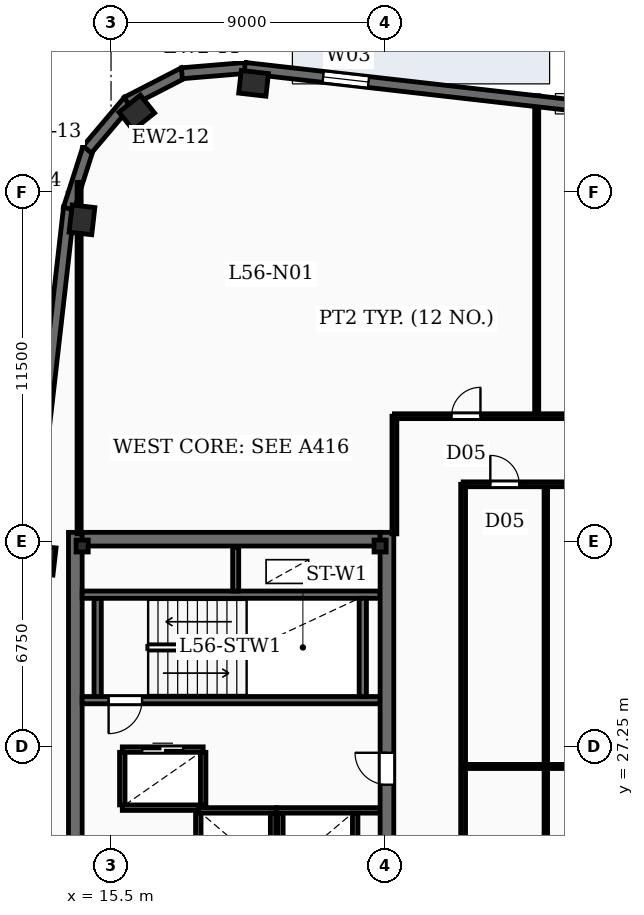
"""IFC4 building model, lengths in metres.
Left out: names, types, materials, properties, quantities, classifications, styles, units other than length and angle.
Written with IfcOpenShell. Run it as: python <this file> out.ifc"""

import sys

from ifc_helpers import new_model, si_unit, direction, frame, frame_2d, origin, origin_2d, place, context, subcontext, project, spatial, rectangle, i_section, extrude, element, fill, save


model = new_model("IFC4")
c1 = context("Model", 3, precision=1e-05, world=origin(), true_north=direction((0.0, 1.0)))
c2 = subcontext(c1, "Body", "Model", "MODEL_VIEW")
j1 = project(units=[si_unit("LENGTHUNIT", "METRE"), si_unit("PLANEANGLEUNIT", "RADIAN")], contexts=[c1])
p1 = place(None, origin())
s1 = spatial("IfcSite", under=j1, at=p1, CompositionType="ELEMENT")
p2 = place(p1, origin())
s2 = spatial("IfcBuilding", under=s1, at=p2, CompositionType="ELEMENT")
p3 = place(p2, frame((0.0, 0.0, 232.2)))
s3 = spatial("IfcBuildingStorey", under=s2, at=p3, CompositionType="ELEMENT", Elevation=232.2)
p4 = place(p3, frame((14.325, 19.0, -0.27), z_axis=(0.0, 0.0, 1.0), x_axis=(0.0, 1.0, 0.0)))
e1 = element("IfcWall", 1, at=p4, inside=s3, PredefinedType="SHEAR", context=c2, shape_type="SweptSolid", body=[
    extrude(rectangle(XDim=15.3, YDim=0.45, at=frame_2d((7.65, 0.0))), origin(), (0.0, 0.0, 1.0), 3.75),
])
p5 = place(p3, frame((24.575, 19.0, -0.27), z_axis=(0.0, 0.0, 1.0), x_axis=(0.0, 1.0, 0.0)))
e2 = element("IfcWall", 2, at=p5, inside=s3, PredefinedType="SHEAR", context=c2, shape_type="SweptSolid", body=[
    extrude(rectangle(XDim=15.3, YDim=0.45, at=frame_2d((7.65, 0.0))), origin(), (0.0, 0.0, 1.0), 3.75),
])
p6 = place(p5, frame((2.5, 0.0, 0.27)))
e3 = element("IfcOpeningElement", 3, at=p6, cuts=e2, PredefinedType="OPENING", context=c2, shape_type="SweptSolid", body=[
    extrude(rectangle(XDim=1.05, YDim=2.15, at=frame_2d((0.525, 1.075))), frame((0.0, 0.235, 0.0), z_axis=(0.0, -1.0, 0.0), x_axis=(1.0, 0.0, 0.0)), (0.0, 0.0, 1.0), 0.47),
])
p7 = place(p5, frame((7.0, 0.0, 0.27)))
e4 = element("IfcOpeningElement", 4, at=p7, cuts=e2, PredefinedType="OPENING", context=c2, shape_type="SweptSolid", body=[
    extrude(rectangle(XDim=1.05, YDim=2.15, at=frame_2d((0.525, 1.075))), frame((0.0, 0.235, 0.0), z_axis=(0.0, -1.0, 0.0), x_axis=(1.0, 0.0, 0.0)), (0.0, 0.0, 1.0), 0.47),
])
p8 = place(p3, frame((14.55, 34.075, -0.27), z_axis=(0.0, 0.0, 1.0), x_axis=(1.0, 0.0, 0.0)))
e5 = element("IfcWall", 5, at=p8, inside=s3, PredefinedType="SHEAR", context=c2, shape_type="SweptSolid", body=[
    extrude(rectangle(XDim=9.8, YDim=0.45, at=frame_2d((4.9, 0.0))), origin(), (0.0, 0.0, 1.0), 3.75),
])
for number, where, z_axis, x_axis in (
    (6, (14.55, 33.85, -0.27), (0.0, 0.0, 1.0), (1.0, 0.0, 0.0)),
    (7, (24.35, 33.85, -0.27), (0.0, 0.0, 1.0), (1.0, 0.0, 0.0)),
):
    element("IfcColumn", number, at=place(p3, frame(where, z_axis=z_axis, x_axis=x_axis)), inside=s3, PredefinedType="COLUMN", context=c2, shape_type="SweptSolid", body=[
        extrude(i_section(OverallWidth=0.399, OverallDepth=0.393, WebThickness=0.023, FlangeThickness=0.037, FilletRadius=0.02, at=origin_2d()), origin(), (0.0, 0.0, 1.0), 3.75),
    ])
for number, where, z_axis, x_axis in (
    (8, (20.189, 49.068, -0.27), (0.0, 0.0, 1.0), (0.994, -0.113, 0.0)),
    (9, (16.346, 48.105, -0.27), (0.0, 0.0, 1.0), (0.783, 0.623, 0.0)),
    (10, (14.544, 44.578, -0.27), (0.0, 0.0, 1.0), (0.113, 0.994, 0.0)),
    (11, (13.269, 33.384, -0.27), (0.0, 0.0, 1.0), (0.113, 0.994, 0.0)),
):
    element("IfcColumn", number, at=place(p3, frame(where, z_axis=z_axis, x_axis=x_axis)), inside=s3, PredefinedType="COLUMN", context=c2, shape_type="SweptSolid", body=[
        extrude(rectangle(XDim=0.9, YDim=0.75, at=origin_2d()), origin(), (0.0, 0.0, 1.0), 3.75),
    ])
p9 = place(p3, frame((19.894, 49.575, 0.0), z_axis=(0.0, 0.0, 1.0), x_axis=(0.993571439016, -0.113206870688, 0.0)))
e12 = element("IfcWall", 12, at=p9, inside=s3, PredefinedType="SOLIDWALL", context=c2, shape_type="SweptSolid", body=[
    extrude(rectangle(XDim=46.8, YDim=0.36, at=frame_2d((23.4, 0.0))), origin(), (0.0, 0.0, 1.0), 3.48),
])
p10 = place(p9, frame((2.6, 0.0, 0.88)))
e13 = element("IfcOpeningElement", 13, at=p10, cuts=e12, PredefinedType="OPENING", context=c2, shape_type="SweptSolid", body=[
    extrude(rectangle(XDim=1.5, YDim=2.05, at=frame_2d((0.75, 1.025))), frame((0.0, 0.19, 0.0), z_axis=(0.0, -1.0, 0.0), x_axis=(1.0, 0.0, 0.0)), (0.0, 0.0, 1.0), 0.38),
])
p11 = place(p9, frame((29.6, 0.0, 0.88)))
e14 = element("IfcOpeningElement", 14, at=p11, cuts=e12, PredefinedType="OPENING", context=c2, shape_type="SweptSolid", body=[
    extrude(rectangle(XDim=1.5, YDim=2.05, at=frame_2d((0.75, 1.025))), frame((0.0, 0.19, 0.0), z_axis=(0.0, -1.0, 0.0), x_axis=(1.0, 0.0, 0.0)), (0.0, 0.0, 1.0), 0.38),
])
for number, where, z_axis, x_axis in (
    (15, (17.83, 49.399, 0.0), (0.0, 0.0, 1.0), (0.997, 0.083, 0.0)),
    (16, (16.024, 48.454, 0.0), (0.0, 0.0, 1.0), (0.889, 0.458, 0.0)),
    (17, (14.718, 46.89, 0.0), (0.0, 0.0, 1.0), (0.646, 0.763, 0.0)),
):
    element("IfcWall", number, at=place(p3, frame(where, z_axis=z_axis, x_axis=x_axis)), inside=s3, PredefinedType="SOLIDWALL", context=c2, shape_type="SweptSolid", body=[
        extrude(rectangle(XDim=2.107, YDim=0.36, at=frame_2d((1.054, 0.0))), origin(), (0.0, 0.0, 1.0), 3.48),
    ])
p12 = place(p3, frame((14.109, 44.945, 0.0), z_axis=(0.0, 0.0, 1.0), x_axis=(0.304872429864, 0.952393196904, 0.0)))
e18 = element("IfcWall", 18, at=p12, inside=s3, PredefinedType="SOLIDWALL", context=c2, shape_type="SweptSolid", body=[
    extrude(rectangle(XDim=2.107, YDim=0.36, at=frame_2d((1.053, 0.0))), origin(), (0.0, 0.0, 1.0), 3.48),
])
p13 = place(p3, frame((10.211, 10.701, 0.0), z_axis=(0.0, 0.0, 1.0), x_axis=(0.113203107947, 0.993571867733, 0.0)))
e19 = element("IfcWall", 19, at=p13, inside=s3, PredefinedType="SOLIDWALL", context=c2, shape_type="SweptSolid", body=[
    extrude(rectangle(XDim=34.5, YDim=0.36, at=frame_2d((17.25, 0.0))), origin(), (0.0, 0.0, 1.0), 3.48),
])
p14 = place(p13, frame((4.2, 0.0, 0.88)))
e20 = element("IfcOpeningElement", 20, at=p14, cuts=e19, PredefinedType="OPENING", context=c2, shape_type="SweptSolid", body=[
    extrude(rectangle(XDim=1.35, YDim=2.2, at=frame_2d((0.675, 1.1))), frame((0.0, 0.19, 0.0), z_axis=(0.0, -1.0, 0.0), x_axis=(1.0, 0.0, 0.0)), (0.0, 0.0, 1.0), 0.38),
])
p15 = place(p13, frame((15.4, 0.0, 0.88)))
e21 = element("IfcOpeningElement", 21, at=p15, cuts=e19, PredefinedType="OPENING", context=c2, shape_type="SweptSolid", body=[
    extrude(rectangle(XDim=1.35, YDim=2.2, at=frame_2d((0.675, 1.1))), frame((0.0, 0.19, 0.0), z_axis=(0.0, -1.0, 0.0), x_axis=(1.0, 0.0, 0.0)), (0.0, 0.0, 1.0), 0.38),
])
p16 = place(p13, frame((26.6, 0.0, 0.88)))
e22 = element("IfcOpeningElement", 22, at=p16, cuts=e19, PredefinedType="OPENING", context=c2, shape_type="SweptSolid", body=[
    extrude(rectangle(XDim=1.35, YDim=2.2, at=frame_2d((0.675, 1.1))), frame((0.0, 0.19, 0.0), z_axis=(0.0, -1.0, 0.0), x_axis=(1.0, 0.0, 0.0)), (0.0, 0.0, 1.0), 0.38),
])
p17 = place(p3, frame((24.35, 28.78, 0.0), z_axis=(0.0, 0.0, 1.0), x_axis=(-1.0, 0.0, 0.0)))
e23 = element("IfcWall", 23, at=p17, inside=s3, PredefinedType="SOLIDWALL", context=c2, shape_type="SweptSolid", body=[
    extrude(rectangle(XDim=9.8, YDim=0.24, at=frame_2d((4.9, 0.0))), origin(), (0.0, 0.0, 1.0), 3.48),
])
p18 = place(p17, frame((7.83, 0.0, 0.0)))
e24 = element("IfcOpeningElement", 24, at=p18, cuts=e23, PredefinedType="OPENING", context=c2, shape_type="SweptSolid", body=[
    extrude(rectangle(XDim=1.1, YDim=2.15, at=frame_2d((0.55, 1.075))), frame((0.0, 0.13, 0.0), z_axis=(0.0, -1.0, 0.0), x_axis=(1.0, 0.0, 0.0)), (0.0, 0.0, 1.0), 0.26),
])
p19 = place(p3, frame((14.55, 32.25, 0.0), z_axis=(0.0, 0.0, 1.0), x_axis=(1.0, 0.0, 0.0)))
e25 = element("IfcWall", 25, at=p19, inside=s3, PredefinedType="SOLIDWALL", context=c2, shape_type="SweptSolid", body=[
    extrude(rectangle(XDim=9.8, YDim=0.24, at=frame_2d((4.9, 0.0))), origin(), (0.0, 0.0, 1.0), 3.48),
])
for number, where, z_axis, x_axis in (
    (26, (15.06, 28.9, 0.0), (0.0, 0.0, 1.0), (0.0, 1.0, 0.0)),
    (27, (23.78, 28.9, 0.0), (0.0, 0.0, 1.0), (0.0, 1.0, 0.0)),
):
    element("IfcWall", number, at=place(p3, frame(where, z_axis=z_axis, x_axis=x_axis)), inside=s3, PredefinedType="SOLIDWALL", context=c2, shape_type="SweptSolid", body=[
        extrude(rectangle(XDim=3.23, YDim=0.24, at=frame_2d((1.615, 0.0))), origin(), (0.0, 0.0, 1.0), 3.48),
    ])
p20 = place(p3, frame((19.6, 32.37, 0.0), z_axis=(0.0, 0.0, 1.0), x_axis=(0.0, 1.0, 0.0)))
e28 = element("IfcWall", 28, at=p20, inside=s3, PredefinedType="SOLIDWALL", context=c2, shape_type="SweptSolid", body=[
    extrude(rectangle(XDim=1.43, YDim=0.2, at=frame_2d((0.715, 0.0))), origin(), (0.0, 0.0, 1.0), 3.48),
])
p21 = place(p3, frame((18.37, 25.155, 0.0), z_axis=(0.0, 0.0, 1.0), x_axis=(1.0, 0.0, 0.0)))
e29 = element("IfcWall", 29, at=p21, inside=s3, PredefinedType="SOLIDWALL", context=c2, shape_type="SweptSolid", body=[
    extrude(rectangle(XDim=2.58, YDim=0.18, at=frame_2d((1.29, 0.0))), origin(), (0.0, 0.0, 1.0), 3.48),
])
for number, where, z_axis, x_axis in (
    (30, (18.37, 23.135, 0.0), (0.0, 0.0, 1.0), (0.0, 1.0, 0.0)),
    (31, (20.83, 23.135, 0.0), (0.0, 0.0, 1.0), (0.0, 1.0, 0.0)),
):
    element("IfcWall", number, at=place(p3, frame(where, z_axis=z_axis, x_axis=x_axis)), inside=s3, PredefinedType="SOLIDWALL", context=c2, shape_type="SweptSolid", body=[
        extrude(rectangle(XDim=1.93, YDim=0.18, at=frame_2d((0.965, 0.0))), origin(), (0.0, 0.0, 1.0), 3.48),
    ])
p22 = place(p3, frame((20.95, 25.155, 0.0), z_axis=(0.0, 0.0, 1.0), x_axis=(1.0, 0.0, 0.0)))
e32 = element("IfcWall", 32, at=p22, inside=s3, PredefinedType="SOLIDWALL", context=c2, shape_type="SweptSolid", body=[
    extrude(rectangle(XDim=3.4, YDim=0.18, at=frame_2d((1.7, 0.0))), origin(), (0.0, 0.0, 1.0), 3.48),
])
for number, where, z_axis, x_axis in (
    (33, (21.07, 23.135, 0.0), (0.0, 0.0, 1.0), (0.0, 1.0, 0.0)),
    (34, (23.53, 23.135, 0.0), (0.0, 0.0, 1.0), (0.0, 1.0, 0.0)),
):
    element("IfcWall", number, at=place(p3, frame(where, z_axis=z_axis, x_axis=x_axis)), inside=s3, PredefinedType="SOLIDWALL", context=c2, shape_type="SweptSolid", body=[
        extrude(rectangle(XDim=1.93, YDim=0.18, at=frame_2d((0.965, 0.0))), origin(), (0.0, 0.0, 1.0), 3.48),
    ])
p23 = place(p3, frame((15.87, 27.155, 0.0), z_axis=(0.0, 0.0, 1.0), x_axis=(1.0, 0.0, 0.0)))
e35 = element("IfcWall", 35, at=p23, inside=s3, PredefinedType="SOLIDWALL", context=c2, shape_type="SweptSolid", body=[
    extrude(rectangle(XDim=2.66, YDim=0.18, at=frame_2d((1.33, 0.0))), origin(), (0.0, 0.0, 1.0), 3.48),
])
p24 = place(p23, frame((0.655, 0.0, 0.0)))
e36 = element("IfcOpeningElement", 36, at=p24, cuts=e35, PredefinedType="OPENING", context=c2, shape_type="SweptSolid", body=[
    extrude(rectangle(XDim=1.35, YDim=2.3, at=frame_2d((0.675, 1.15))), frame((0.0, 0.1, 0.0), z_axis=(0.0, -1.0, 0.0), x_axis=(1.0, 0.0, 0.0)), (0.0, 0.0, 1.0), 0.2),
])
p25 = place(p3, frame((15.87, 25.245, 0.0), z_axis=(0.0, 0.0, 1.0), x_axis=(1.0, 0.0, 0.0)))
e37 = element("IfcWall", 37, at=p25, inside=s3, PredefinedType="SOLIDWALL", context=c2, shape_type="SweptSolid", body=[
    extrude(rectangle(XDim=2.66, YDim=0.18, at=frame_2d((1.33, 0.0))), origin(), (0.0, 0.0, 1.0), 3.48),
])
for number, where, z_axis, x_axis in (
    (38, (15.87, 25.335, 0.0), (0.0, 0.0, 1.0), (0.0, 1.0, 0.0)),
    (39, (18.53, 25.335, 0.0), (0.0, 0.0, 1.0), (0.0, 1.0, 0.0)),
):
    element("IfcWall", number, at=place(p3, frame(where, z_axis=z_axis, x_axis=x_axis)), inside=s3, PredefinedType="SOLIDWALL", context=c2, shape_type="SweptSolid", body=[
        extrude(rectangle(XDim=1.73, YDim=0.18, at=frame_2d((0.865, 0.0))), origin(), (0.0, 0.0, 1.0), 3.48),
    ])
p26 = place(p3, frame((29.5, 38.12, 0.0), z_axis=(0.0, 0.0, 1.0), x_axis=(0.0, 1.0, 0.0)))
e40 = element("IfcWall", 40, at=p26, inside=s3, PredefinedType="PARTITIONING", context=c2, shape_type="SweptSolid", body=[
    extrude(rectangle(XDim=10.541, YDim=0.135, at=frame_2d((5.271, 0.0))), origin(), (0.0, 0.0, 1.0), 2.54),
])
p27 = place(p3, frame((24.82, 34.25, 0.0), z_axis=(0.0, 0.0, 1.0), x_axis=(0.0, 1.0, 0.0)))
e41 = element("IfcWall", 41, at=p27, inside=s3, PredefinedType="PARTITIONING", context=c2, shape_type="SweptSolid", body=[
    extrude(rectangle(XDim=3.87, YDim=0.16, at=frame_2d((1.935, 0.0))), origin(), (0.0, 0.0, 1.0), 2.54),
])
p28 = place(p3, frame((14.45, 34.25, 0.0), z_axis=(0.0, 0.0, 1.0), x_axis=(0.0, 1.0, 0.0)))
e42 = element("IfcWall", 42, at=p28, inside=s3, PredefinedType="PARTITIONING", context=c2, shape_type="SweptSolid", body=[
    extrude(rectangle(XDim=11.562, YDim=0.135, at=frame_2d((5.781, 0.0))), origin(), (0.0, 0.0, 1.0), 2.54),
])
p29 = place(p3, frame((24.82, 38.12, 0.0), z_axis=(0.0, 0.0, 1.0), x_axis=(1.0, 0.0, 0.0)))
e43 = element("IfcWall", 43, at=p29, inside=s3, PredefinedType="PARTITIONING", context=c2, shape_type="SweptSolid", body=[
    extrude(rectangle(XDim=25.26, YDim=0.16, at=frame_2d((12.63, 0.0))), origin(), (0.0, 0.0, 1.0), 2.54),
])
p30 = place(p29, frame((1.88, 0.0, 0.0)))
e44 = element("IfcOpeningElement", 44, at=p30, cuts=e43, PredefinedType="OPENING", context=c2, shape_type="SweptSolid", body=[
    extrude(rectangle(XDim=0.95, YDim=2.15, at=frame_2d((0.475, 1.075))), frame((0.0, 0.09, 0.0), z_axis=(0.0, -1.0, 0.0), x_axis=(1.0, 0.0, 0.0)), (0.0, 0.0, 1.0), 0.18),
])
p31 = place(p29, frame((7.555, 0.0, 0.0)))
e45 = element("IfcOpeningElement", 45, at=p31, cuts=e43, PredefinedType="OPENING", context=c2, shape_type="SweptSolid", body=[
    extrude(rectangle(XDim=0.95, YDim=2.15, at=frame_2d((0.475, 1.075))), frame((0.0, 0.09, 0.0), z_axis=(0.0, -1.0, 0.0), x_axis=(1.0, 0.0, 0.0)), (0.0, 0.0, 1.0), 0.18),
])
p32 = place(p29, frame((11.855, 0.0, 0.0)))
e46 = element("IfcOpeningElement", 46, at=p32, cuts=e43, PredefinedType="OPENING", context=c2, shape_type="SweptSolid", body=[
    extrude(rectangle(XDim=0.95, YDim=2.15, at=frame_2d((0.475, 1.075))), frame((0.0, 0.09, 0.0), z_axis=(0.0, -1.0, 0.0), x_axis=(1.0, 0.0, 0.0)), (0.0, 0.0, 1.0), 0.18),
])
p33 = place(p29, frame((16.855, 0.0, 0.0)))
e47 = element("IfcOpeningElement", 47, at=p33, cuts=e43, PredefinedType="OPENING", context=c2, shape_type="SweptSolid", body=[
    extrude(rectangle(XDim=0.95, YDim=2.15, at=frame_2d((0.475, 1.075))), frame((0.0, 0.09, 0.0), z_axis=(0.0, -1.0, 0.0), x_axis=(1.0, 0.0, 0.0)), (0.0, 0.0, 1.0), 0.18),
])
p34 = place(p29, frame((22.23, 0.0, 0.0)))
e48 = element("IfcOpeningElement", 48, at=p34, cuts=e43, PredefinedType="OPENING", context=c2, shape_type="SweptSolid", body=[
    extrude(rectangle(XDim=0.95, YDim=2.15, at=frame_2d((0.475, 1.075))), frame((0.0, 0.09, 0.0), z_axis=(0.0, -1.0, 0.0), x_axis=(1.0, 0.0, 0.0)), (0.0, 0.0, 1.0), 0.18),
])
p35 = place(p3, frame((29.8, 15.38, 0.0), z_axis=(0.0, 0.0, 1.0), x_axis=(0.0, 1.0, 0.0)))
e49 = element("IfcWall", 49, at=p35, inside=s3, PredefinedType="PARTITIONING", context=c2, shape_type="SweptSolid", body=[
    extrude(rectangle(XDim=20.5, YDim=0.115, at=frame_2d((10.25, 0.0))), origin(), (0.0, 0.0, 1.0), 2.54),
])
p36 = place(p3, frame((27.08, 26.6, 0.0), z_axis=(0.0, 0.0, 1.0), x_axis=(1.0, 0.0, 0.0)))
e50 = element("IfcWall", 50, at=p36, inside=s3, PredefinedType="PARTITIONING", context=c2, shape_type="SweptSolid", body=[
    extrude(rectangle(XDim=20.74, YDim=0.135, at=frame_2d((10.37, 0.0))), origin(), (0.0, 0.0, 1.0), 2.54),
])
p37 = place(p3, frame((27.08, 35.88, 0.0), z_axis=(0.0, 0.0, 1.0), x_axis=(1.0, 0.0, 0.0)))
e51 = element("IfcWall", 51, at=p37, inside=s3, PredefinedType="PARTITIONING", context=c2, shape_type="SweptSolid", body=[
    extrude(rectangle(XDim=20.74, YDim=0.16, at=frame_2d((10.37, 0.0))), origin(), (0.0, 0.0, 1.0), 2.54),
])
p38 = place(p37, frame((0.895, 0.0, 0.0)))
e52 = element("IfcOpeningElement", 52, at=p38, cuts=e51, PredefinedType="OPENING", context=c2, shape_type="SweptSolid", body=[
    extrude(rectangle(XDim=0.95, YDim=2.15, at=frame_2d((0.475, 1.075))), frame((0.0, 0.09, 0.0), z_axis=(0.0, -1.0, 0.0), x_axis=(1.0, 0.0, 0.0)), (0.0, 0.0, 1.0), 0.18),
])
p39 = place(p37, frame((5.295, 0.0, 0.0)))
e53 = element("IfcOpeningElement", 53, at=p39, cuts=e51, PredefinedType="OPENING", context=c2, shape_type="SweptSolid", body=[
    extrude(rectangle(XDim=0.95, YDim=2.15, at=frame_2d((0.475, 1.075))), frame((0.0, 0.09, 0.0), z_axis=(0.0, -1.0, 0.0), x_axis=(1.0, 0.0, 0.0)), (0.0, 0.0, 1.0), 0.18),
])
p40 = place(p37, frame((9.295, 0.0, 0.0)))
e54 = element("IfcOpeningElement", 54, at=p40, cuts=e51, PredefinedType="OPENING", context=c2, shape_type="SweptSolid", body=[
    extrude(rectangle(XDim=0.95, YDim=2.15, at=frame_2d((0.475, 1.075))), frame((0.0, 0.09, 0.0), z_axis=(0.0, -1.0, 0.0), x_axis=(1.0, 0.0, 0.0)), (0.0, 0.0, 1.0), 0.18),
])
p41 = place(p37, frame((13.945, 0.0, 0.0)))
e55 = element("IfcOpeningElement", 55, at=p41, cuts=e51, PredefinedType="OPENING", context=c2, shape_type="SweptSolid", body=[
    extrude(rectangle(XDim=0.95, YDim=2.15, at=frame_2d((0.475, 1.075))), frame((0.0, 0.09, 0.0), z_axis=(0.0, -1.0, 0.0), x_axis=(1.0, 0.0, 0.0)), (0.0, 0.0, 1.0), 0.18),
])
p42 = place(p37, frame((17.445, 0.0, 0.0)))
e56 = element("IfcOpeningElement", 56, at=p42, cuts=e51, PredefinedType="OPENING", context=c2, shape_type="SweptSolid", body=[
    extrude(rectangle(XDim=0.95, YDim=2.15, at=frame_2d((0.475, 1.075))), frame((0.0, 0.09, 0.0), z_axis=(0.0, -1.0, 0.0), x_axis=(1.0, 0.0, 0.0)), (0.0, 0.0, 1.0), 0.18),
])
p43 = place(p37, frame((19.57, 0.0, 0.0)))
e57 = element("IfcOpeningElement", 57, at=p43, cuts=e51, PredefinedType="OPENING", context=c2, shape_type="SweptSolid", body=[
    extrude(rectangle(XDim=0.95, YDim=2.15, at=frame_2d((0.475, 1.075))), frame((0.0, 0.09, 0.0), z_axis=(0.0, -1.0, 0.0), x_axis=(1.0, 0.0, 0.0)), (0.0, 0.0, 1.0), 0.18),
])
p44 = place(p3, frame((27.08, 15.38, 0.0), z_axis=(0.0, 0.0, 1.0), x_axis=(0.0, 1.0, 0.0)))
e58 = element("IfcWall", 58, at=p44, inside=s3, PredefinedType="PARTITIONING", context=c2, shape_type="SweptSolid", body=[
    extrude(rectangle(XDim=20.5, YDim=0.16, at=frame_2d((10.25, 0.0))), origin(), (0.0, 0.0, 1.0), 2.54),
])
p45 = place(p10, origin())
e59 = element("IfcWindow", 59, at=p45, inside=s3, PartitioningType="SINGLE_PANEL", PredefinedType="WINDOW", context=c2, shape_type="SweptSolid", body=[
    extrude(rectangle(XDim=1.5, YDim=2.05, at=frame_2d((0.75, 1.025))), frame((0.0, 0.03, 0.0), z_axis=(0.0, -1.0, 0.0), x_axis=(1.0, 0.0, 0.0)), (0.0, 0.0, 1.0), 0.06),
])
fill(e13, e59)
p46 = place(p7, origin())
e60 = element("IfcDoor", 60, at=p46, inside=s3, OperationType="SINGLE_SWING_RIGHT", PredefinedType="DOOR", context=c2, shape_type="SweptSolid", body=[
    extrude(rectangle(XDim=1.05, YDim=2.15, at=frame_2d((0.525, 1.075))), frame((0.0, 0.025, 0.0), z_axis=(0.0, -1.0, 0.0), x_axis=(1.0, 0.0, 0.0)), (0.0, 0.0, 1.0), 0.05),
])
fill(e4, e60)
p47 = place(p18, origin())
e61 = element("IfcDoor", 61, at=p47, inside=s3, OperationType="SINGLE_SWING_RIGHT", PredefinedType="DOOR", context=c2, shape_type="SweptSolid", body=[
    extrude(rectangle(XDim=1.1, YDim=2.15, at=frame_2d((0.55, 1.075))), frame((0.0, 0.025, 0.0), z_axis=(0.0, -1.0, 0.0), x_axis=(1.0, 0.0, 0.0)), (0.0, 0.0, 1.0), 0.05),
])
fill(e24, e61)
p48 = place(p24, origin())
e62 = element("IfcDoor", 62, at=p48, inside=s3, OperationType="DOUBLE_DOOR_SLIDING", PredefinedType="DOOR", context=c2, shape_type="SweptSolid", body=[
    extrude(rectangle(XDim=1.35, YDim=2.3, at=frame_2d((0.675, 1.15))), frame((0.0, 0.025, 0.0), z_axis=(0.0, -1.0, 0.0), x_axis=(1.0, 0.0, 0.0)), (0.0, 0.0, 1.0), 0.05),
])
fill(e36, e62)
p49 = place(p30, origin())
e63 = element("IfcDoor", 63, at=p49, inside=s3, OperationType="SINGLE_SWING_RIGHT", PredefinedType="DOOR", context=c2, shape_type="SweptSolid", body=[
    extrude(rectangle(XDim=0.95, YDim=2.15, at=frame_2d((0.475, 1.075))), frame((0.0, 0.025, 0.0), z_axis=(0.0, -1.0, 0.0), x_axis=(1.0, 0.0, 0.0)), (0.0, 0.0, 1.0), 0.05),
])
fill(e44, e63)
p50 = place(p38, origin())
e64 = element("IfcDoor", 64, at=p50, inside=s3, OperationType="SINGLE_SWING_LEFT", PredefinedType="DOOR", context=c2, shape_type="SweptSolid", body=[
    extrude(rectangle(XDim=0.95, YDim=2.15, at=frame_2d((0.475, 1.075))), frame((0.0, 0.025, 0.0), z_axis=(0.0, -1.0, 0.0), x_axis=(1.0, 0.0, 0.0)), (0.0, 0.0, 1.0), 0.05),
])
fill(e52, e64)
save(model, sys.argv[1])
